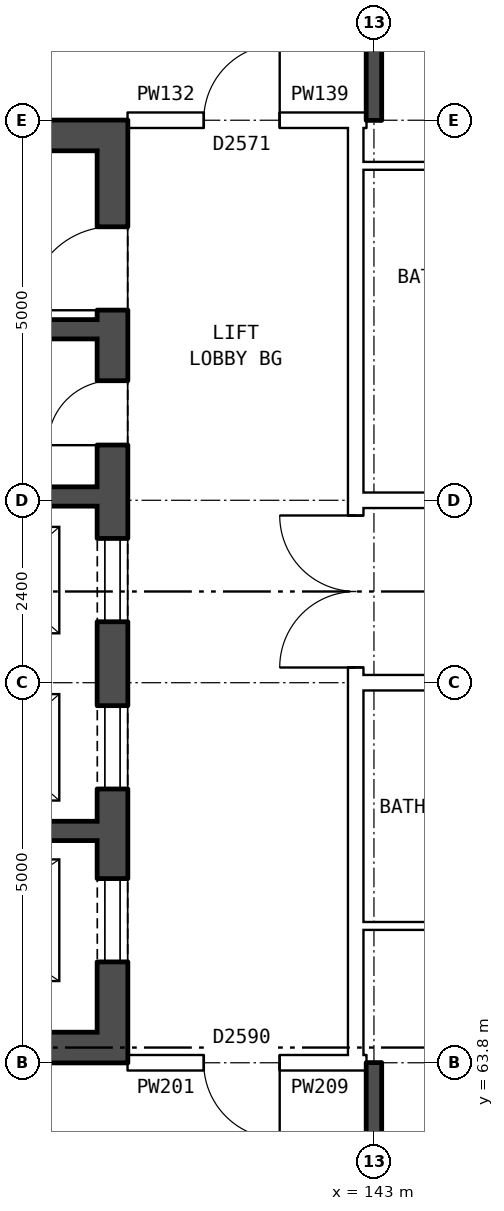
"""IFC4 building model, lengths in metres.
Left out: names, types, materials, properties, quantities, classifications, styles, units other than length and angle.
Written with IfcOpenShell. Run it as: python <this file> out.ifc"""

import sys

from ifc_helpers import new_model, si_unit, direction, frame, frame_2d, origin, place, context, subcontext, project, spatial, rectangle, extrude, element, fill, save


model = new_model("IFC4")
c1 = context("Model", 3, precision=1e-05, world=origin(), true_north=direction((0.0, 1.0)))
c2 = subcontext(c1, "Body", "Model", "MODEL_VIEW")
j1 = project(units=[si_unit("LENGTHUNIT", "METRE"), si_unit("PLANEANGLEUNIT", "RADIAN")], contexts=[c1])
p1 = place(None, origin())
s1 = spatial("IfcSite", under=j1, at=p1, CompositionType="ELEMENT")
p2 = place(p1, origin())
s2 = spatial("IfcBuilding", under=s1, at=p2, CompositionType="ELEMENT")
p3 = place(p2, frame((0.0, 0.0, 230.7)))
s3 = spatial("IfcBuildingStorey", under=s2, at=p3, CompositionType="ELEMENT", Elevation=230.7)
p4 = place(p3, frame((139.56, 63.8, 0.0), z_axis=(0.0, 0.0, 1.0), x_axis=(0.0, 1.0, 0.0)))
e1 = element("IfcWall", 1, at=p4, inside=s3, PredefinedType="SHEAR", context=c2, shape_type="SweptSolid", body=[
    extrude(rectangle(XDim=12.4, YDim=0.4, at=frame_2d((6.2, 0.0))), origin(), (0.0, 0.0, 1.0), 2.85),
])
p5 = place(p4, frame((1.325, 0.0, 0.0)))
e2 = element("IfcOpeningElement", 2, at=p5, cuts=e1, PredefinedType="OPENING", context=c2, shape_type="SweptSolid", body=[
    extrude(rectangle(XDim=1.1, YDim=2.1, at=frame_2d((0.55, 1.05))), frame((0.0, 0.21, 0.0), z_axis=(0.0, -1.0, 0.0), x_axis=(1.0, 0.0, 0.0)), (0.0, 0.0, 1.0), 0.42),
])
p6 = place(p4, frame((3.6, 0.0, 0.0)))
e3 = element("IfcOpeningElement", 3, at=p6, cuts=e1, PredefinedType="OPENING", context=c2, shape_type="SweptSolid", body=[
    extrude(rectangle(XDim=1.1, YDim=2.1, at=frame_2d((0.55, 1.05))), frame((0.0, 0.21, 0.0), z_axis=(0.0, -1.0, 0.0), x_axis=(1.0, 0.0, 0.0)), (0.0, 0.0, 1.0), 0.42),
])
p7 = place(p4, frame((5.8, 0.0, 0.0)))
e4 = element("IfcOpeningElement", 4, at=p7, cuts=e1, PredefinedType="OPENING", context=c2, shape_type="SweptSolid", body=[
    extrude(rectangle(XDim=1.1, YDim=2.1, at=frame_2d((0.55, 1.05))), frame((0.0, 0.21, 0.0), z_axis=(0.0, -1.0, 0.0), x_axis=(1.0, 0.0, 0.0)), (0.0, 0.0, 1.0), 0.42),
])
p8 = place(p4, frame((9.9, 0.0, 0.0)))
e5 = element("IfcOpeningElement", 5, at=p8, cuts=e1, PredefinedType="OPENING", context=c2, shape_type="SweptSolid", body=[
    extrude(rectangle(XDim=1.1, YDim=2.1, at=frame_2d((0.55, 1.05))), frame((0.0, 0.21, 0.0), z_axis=(0.0, -1.0, 0.0), x_axis=(1.0, 0.0, 0.0)), (0.0, 0.0, 1.0), 0.42),
])
p9 = place(p4, frame((8.125, 0.0, 0.0)))
e6 = element("IfcOpeningElement", 6, at=p9, cuts=e1, PredefinedType="OPENING", context=c2, shape_type="SweptSolid", body=[
    extrude(rectangle(XDim=0.85, YDim=2.1, at=frame_2d((0.425, 1.05))), frame((0.0, 0.21, 0.0), z_axis=(0.0, -1.0, 0.0), x_axis=(1.0, 0.0, 0.0)), (0.0, 0.0, 1.0), 0.42),
])
for number, where, z_axis, x_axis in (
    (7, (139.36, 64.0, 0.0), (0.0, 0.0, 1.0), (-1.0, 0.0, 0.0)),
    (8, (139.36, 76.0, 0.0), (0.0, 0.0, 1.0), (-1.0, 0.0, 0.0)),
):
    element("IfcWall", number, at=place(p3, frame(where, z_axis=z_axis, x_axis=x_axis)), inside=s3, PredefinedType="SHEAR", context=c2, shape_type="SweptSolid", body=[
        extrude(rectangle(XDim=7.6, YDim=0.4, at=frame_2d((3.8, 0.0))), origin(), (0.0, 0.0, 1.0), 2.85),
    ])
p10 = place(p3, frame((139.36, 66.85, 0.0), z_axis=(0.0, 0.0, 1.0), x_axis=(-1.0, 0.0, 0.0)))
e9 = element("IfcWall", 9, at=p10, inside=s3, PredefinedType="SHEAR", context=c2, shape_type="SweptSolid", body=[
    extrude(rectangle(XDim=4.775, YDim=0.25, at=frame_2d((2.388, 0.0))), origin(), (0.0, 0.0, 1.0), 2.85),
])
p11 = place(p3, frame((139.36, 71.25, 0.0), z_axis=(0.0, 0.0, 1.0), x_axis=(-1.0, 0.0, 0.0)))
e10 = element("IfcWall", 10, at=p11, inside=s3, PredefinedType="SHEAR", context=c2, shape_type="SweptSolid", body=[
    extrude(rectangle(XDim=7.6, YDim=0.25, at=frame_2d((3.8, 0.0))), origin(), (0.0, 0.0, 1.0), 2.85),
])
p12 = place(p11, frame((5.175, 0.0, 0.0)))
e11 = element("IfcOpeningElement", 11, at=p12, cuts=e10, PredefinedType="OPENING", context=c2, shape_type="SweptSolid", body=[
    extrude(rectangle(XDim=1.1, YDim=2.1, at=frame_2d((0.55, 1.05))), frame((0.0, 0.135, 0.0), z_axis=(0.0, -1.0, 0.0), x_axis=(1.0, 0.0, 0.0)), (0.0, 0.0, 1.0), 0.27),
])
p13 = place(p11, frame((3.35, 0.0, 0.0)))
e12 = element("IfcOpeningElement", 12, at=p13, cuts=e10, PredefinedType="OPENING", context=c2, shape_type="SweptSolid", body=[
    extrude(rectangle(XDim=0.85, YDim=2.1, at=frame_2d((0.425, 1.05))), frame((0.0, 0.135, 0.0), z_axis=(0.0, -1.0, 0.0), x_axis=(1.0, 0.0, 0.0)), (0.0, 0.0, 1.0), 0.27),
])
p14 = place(p3, frame((139.36, 73.45, 0.0), z_axis=(0.0, 0.0, 1.0), x_axis=(-1.0, 0.0, 0.0)))
e13 = element("IfcWall", 13, at=p14, inside=s3, PredefinedType="SHEAR", context=c2, shape_type="SweptSolid", body=[
    extrude(rectangle(XDim=2.525, YDim=0.25, at=frame_2d((1.263, 0.0))), origin(), (0.0, 0.0, 1.0), 2.85),
])
p15 = place(p3, frame((142.76, 63.9, 0.0), z_axis=(0.0, 0.0, 1.0), x_axis=(0.0, 1.0, 0.0)))
e14 = element("IfcWall", 14, at=p15, inside=s3, PredefinedType="PARTITIONING", context=c2, shape_type="SweptSolid", body=[
    extrude(rectangle(XDim=12.2, YDim=0.2, at=frame_2d((6.1, 0.0))), origin(), (0.0, 0.0, 1.0), 2.85),
])
p16 = place(p15, frame((5.1, 0.0, 0.0)))
e15 = element("IfcOpeningElement", 15, at=p16, cuts=e14, PredefinedType="OPENING", context=c2, shape_type="SweptSolid", body=[
    extrude(rectangle(XDim=2.0, YDim=2.1, at=frame_2d((1.0, 1.05))), frame((0.0, 0.11, 0.0), z_axis=(0.0, -1.0, 0.0), x_axis=(1.0, 0.0, 0.0)), (0.0, 0.0, 1.0), 0.22),
])
p17 = place(p3, frame((139.76, 63.8, 0.0), z_axis=(0.0, 0.0, 1.0), x_axis=(1.0, 0.0, 0.0)))
e16 = element("IfcWall", 16, at=p17, inside=s3, PredefinedType="PARTITIONING", context=c2, shape_type="SweptSolid", body=[
    extrude(rectangle(XDim=3.0, YDim=0.2, at=frame_2d((1.5, 0.0))), origin(), (0.0, 0.0, 1.0), 2.85),
])
p18 = place(p17, frame((1.0, 0.0, 0.0)))
e17 = element("IfcOpeningElement", 17, at=p18, cuts=e16, PredefinedType="OPENING", context=c2, shape_type="SweptSolid", body=[
    extrude(rectangle(XDim=1.0, YDim=2.1, at=frame_2d((0.5, 1.05))), frame((0.0, 0.11, 0.0), z_axis=(0.0, -1.0, 0.0), x_axis=(1.0, 0.0, 0.0)), (0.0, 0.0, 1.0), 0.22),
])
p19 = place(p3, frame((142.76, 63.8, 0.0), z_axis=(0.0, 0.0, 1.0), x_axis=(1.0, 0.0, 0.0)))
e18 = element("IfcWall", 18, at=p19, inside=s3, PredefinedType="PARTITIONING", context=c2, shape_type="SweptSolid", body=[
    extrude(rectangle(XDim=0.14, YDim=0.2, at=frame_2d((0.07, 0.0))), origin(), (0.0, 0.0, 1.0), 2.85),
])
p20 = place(p3, frame((142.76, 65.6, 0.0), z_axis=(0.0, 0.0, 1.0), x_axis=(1.0, 0.0, 0.0)))
e19 = element("IfcWall", 19, at=p20, inside=s3, PredefinedType="PARTITIONING", context=c2, shape_type="SweptSolid", body=[
    extrude(rectangle(XDim=3.24, YDim=0.1, at=frame_2d((1.62, 0.0))), origin(), (0.0, 0.0, 1.0), 2.85),
])
p21 = place(p3, frame((142.76, 68.8, 0.0), z_axis=(0.0, 0.0, 1.0), x_axis=(1.0, 0.0, 0.0)))
e20 = element("IfcWall", 20, at=p21, inside=s3, PredefinedType="PARTITIONING", context=c2, shape_type="SweptSolid", body=[
    extrude(rectangle(XDim=14.48, YDim=0.2, at=frame_2d((7.24, 0.0))), origin(), (0.0, 0.0, 1.0), 2.85),
])
p22 = place(p21, frame((4.24, 0.0, 0.0)))
e21 = element("IfcOpeningElement", 21, at=p22, cuts=e20, PredefinedType="OPENING", context=c2, shape_type="SweptSolid", body=[
    extrude(rectangle(XDim=1.0, YDim=2.1, at=frame_2d((0.5, 1.05))), frame((0.0, 0.11, 0.0), z_axis=(0.0, -1.0, 0.0), x_axis=(1.0, 0.0, 0.0)), (0.0, 0.0, 1.0), 0.22),
])
p23 = place(p21, frame((10.24, 0.0, 0.0)))
e22 = element("IfcOpeningElement", 22, at=p23, cuts=e20, PredefinedType="OPENING", context=c2, shape_type="SweptSolid", body=[
    extrude(rectangle(XDim=1.0, YDim=2.1, at=frame_2d((0.5, 1.05))), frame((0.0, 0.11, 0.0), z_axis=(0.0, -1.0, 0.0), x_axis=(1.0, 0.0, 0.0)), (0.0, 0.0, 1.0), 0.22),
])
p24 = place(p3, frame((142.76, 71.2, 0.0), z_axis=(0.0, 0.0, 1.0), x_axis=(1.0, 0.0, 0.0)))
e23 = element("IfcWall", 23, at=p24, inside=s3, PredefinedType="PARTITIONING", context=c2, shape_type="SweptSolid", body=[
    extrude(rectangle(XDim=14.48, YDim=0.2, at=frame_2d((7.24, 0.0))), origin(), (0.0, 0.0, 1.0), 2.85),
])
p25 = place(p24, frame((4.24, 0.0, 0.0)))
e24 = element("IfcOpeningElement", 24, at=p25, cuts=e23, PredefinedType="OPENING", context=c2, shape_type="SweptSolid", body=[
    extrude(rectangle(XDim=1.0, YDim=2.1, at=frame_2d((0.5, 1.05))), frame((0.0, 0.11, 0.0), z_axis=(0.0, -1.0, 0.0), x_axis=(1.0, 0.0, 0.0)), (0.0, 0.0, 1.0), 0.22),
])
p26 = place(p24, frame((10.24, 0.0, 0.0)))
e25 = element("IfcOpeningElement", 25, at=p26, cuts=e23, PredefinedType="OPENING", context=c2, shape_type="SweptSolid", body=[
    extrude(rectangle(XDim=1.0, YDim=2.1, at=frame_2d((0.5, 1.05))), frame((0.0, 0.11, 0.0), z_axis=(0.0, -1.0, 0.0), x_axis=(1.0, 0.0, 0.0)), (0.0, 0.0, 1.0), 0.22),
])
p27 = place(p3, frame((142.76, 75.6, 0.0), z_axis=(0.0, 0.0, 1.0), x_axis=(1.0, 0.0, 0.0)))
e26 = element("IfcWall", 26, at=p27, inside=s3, PredefinedType="PARTITIONING", context=c2, shape_type="SweptSolid", body=[
    extrude(rectangle(XDim=3.24, YDim=0.1, at=frame_2d((1.62, 0.0))), origin(), (0.0, 0.0, 1.0), 2.85),
])
p28 = place(p3, frame((139.76, 76.2, 0.0), z_axis=(0.0, 0.0, 1.0), x_axis=(1.0, 0.0, 0.0)))
e27 = element("IfcWall", 27, at=p28, inside=s3, PredefinedType="PARTITIONING", context=c2, shape_type="SweptSolid", body=[
    extrude(rectangle(XDim=3.0, YDim=0.2, at=frame_2d((1.5, 0.0))), origin(), (0.0, 0.0, 1.0), 2.85),
])
p29 = place(p28, frame((1.0, 0.0, 0.0)))
e28 = element("IfcOpeningElement", 28, at=p29, cuts=e27, PredefinedType="OPENING", context=c2, shape_type="SweptSolid", body=[
    extrude(rectangle(XDim=1.0, YDim=2.1, at=frame_2d((0.5, 1.05))), frame((0.0, 0.11, 0.0), z_axis=(0.0, -1.0, 0.0), x_axis=(1.0, 0.0, 0.0)), (0.0, 0.0, 1.0), 0.22),
])
p30 = place(p3, frame((142.76, 76.2, 0.0), z_axis=(0.0, 0.0, 1.0), x_axis=(1.0, 0.0, 0.0)))
e29 = element("IfcWall", 29, at=p30, inside=s3, PredefinedType="PARTITIONING", context=c2, shape_type="SweptSolid", body=[
    extrude(rectangle(XDim=0.14, YDim=0.2, at=frame_2d((0.07, 0.0))), origin(), (0.0, 0.0, 1.0), 2.85),
])
for number, where, z_axis, x_axis in (
    (30, (143.0, 54.36, 0.0), (0.0, 0.0, 1.0), (0.0, 1.0, 0.0)),
    (31, (143.0, 76.2, 0.0), (0.0, 0.0, 1.0), (0.0, 1.0, 0.0)),
):
    element("IfcWall", number, at=place(p3, frame(where, z_axis=z_axis, x_axis=x_axis)), inside=s3, PredefinedType="SOLIDWALL", context=c2, shape_type="SweptSolid", body=[
        extrude(rectangle(XDim=9.44, YDim=0.2, at=frame_2d((4.72, 0.0))), origin(), (0.0, 0.0, 1.0), 2.85),
    ])
p31 = place(p5, origin())
e32 = element("IfcDoor", 32, at=p31, inside=s3, OperationType="DOUBLE_DOOR_SLIDING", PredefinedType="DOOR", context=c2, shape_type="SweptSolid", body=[
    extrude(rectangle(XDim=1.1, YDim=2.1, at=frame_2d((0.55, 1.05))), frame((0.0, 0.185, 0.0), z_axis=(0.0, -1.0, 0.0), x_axis=(1.0, 0.0, 0.0)), (0.0, 0.0, 1.0), 0.05),
])
fill(e2, e32)
p32 = place(p6, origin())
e33 = element("IfcDoor", 33, at=p32, inside=s3, OperationType="DOUBLE_DOOR_SLIDING", PredefinedType="DOOR", context=c2, shape_type="SweptSolid", body=[
    extrude(rectangle(XDim=1.1, YDim=2.1, at=frame_2d((0.55, 1.05))), frame((0.0, 0.185, 0.0), z_axis=(0.0, -1.0, 0.0), x_axis=(1.0, 0.0, 0.0)), (0.0, 0.0, 1.0), 0.05),
])
fill(e3, e33)
p33 = place(p7, origin())
e34 = element("IfcDoor", 34, at=p33, inside=s3, OperationType="DOUBLE_DOOR_SLIDING", PredefinedType="DOOR", context=c2, shape_type="SweptSolid", body=[
    extrude(rectangle(XDim=1.1, YDim=2.1, at=frame_2d((0.55, 1.05))), frame((0.0, 0.185, 0.0), z_axis=(0.0, -1.0, 0.0), x_axis=(1.0, 0.0, 0.0)), (0.0, 0.0, 1.0), 0.05),
])
fill(e4, e34)
p34 = place(p8, origin())
e35 = element("IfcDoor", 35, at=p34, inside=s3, OperationType="SINGLE_SWING_LEFT", PredefinedType="DOOR", context=c2, shape_type="SweptSolid", body=[
    extrude(rectangle(XDim=1.1, YDim=2.1, at=frame_2d((0.55, 1.05))), frame((0.0, 0.185, 0.0), z_axis=(0.0, -1.0, 0.0), x_axis=(1.0, 0.0, 0.0)), (0.0, 0.0, 1.0), 0.05),
])
fill(e5, e35)
p35 = place(p9, origin())
e36 = element("IfcDoor", 36, at=p35, inside=s3, OperationType="SINGLE_SWING_LEFT", PredefinedType="DOOR", context=c2, shape_type="SweptSolid", body=[
    extrude(rectangle(XDim=0.85, YDim=2.1, at=frame_2d((0.425, 1.05))), frame((0.0, 0.185, 0.0), z_axis=(0.0, -1.0, 0.0), x_axis=(1.0, 0.0, 0.0)), (0.0, 0.0, 1.0), 0.05),
])
fill(e6, e36)
p36 = place(p16, origin())
e37 = element("IfcDoor", 37, at=p36, inside=s3, OperationType="DOUBLE_DOOR_SINGLE_SWING", PredefinedType="DOOR", context=c2, shape_type="SweptSolid", body=[
    extrude(rectangle(XDim=2.0, YDim=2.1, at=frame_2d((1.0, 1.05))), frame((0.0, 0.025, 0.0), z_axis=(0.0, -1.0, 0.0), x_axis=(1.0, 0.0, 0.0)), (0.0, 0.0, 1.0), 0.05),
])
fill(e15, e37)
p37 = place(p18, frame((1.0, 0.0, 0.0), z_axis=(0.0, 0.0, 1.0), x_axis=(-1.0, 0.0, 0.0)))
e38 = element("IfcDoor", 38, at=p37, inside=s3, OperationType="SINGLE_SWING_LEFT", PredefinedType="DOOR", context=c2, shape_type="SweptSolid", body=[
    extrude(rectangle(XDim=1.0, YDim=2.1, at=frame_2d((0.5, 1.05))), frame((0.0, 0.025, 0.0), z_axis=(0.0, -1.0, 0.0), x_axis=(1.0, 0.0, 0.0)), (0.0, 0.0, 1.0), 0.05),
])
fill(e17, e38)
p38 = place(p29, origin())
e39 = element("IfcDoor", 39, at=p38, inside=s3, OperationType="SINGLE_SWING_RIGHT", PredefinedType="DOOR", context=c2, shape_type="SweptSolid", body=[
    extrude(rectangle(XDim=1.0, YDim=2.1, at=frame_2d((0.5, 1.05))), frame((0.0, 0.025, 0.0), z_axis=(0.0, -1.0, 0.0), x_axis=(1.0, 0.0, 0.0)), (0.0, 0.0, 1.0), 0.05),
])
fill(e28, e39)
save(model, sys.argv[1])
